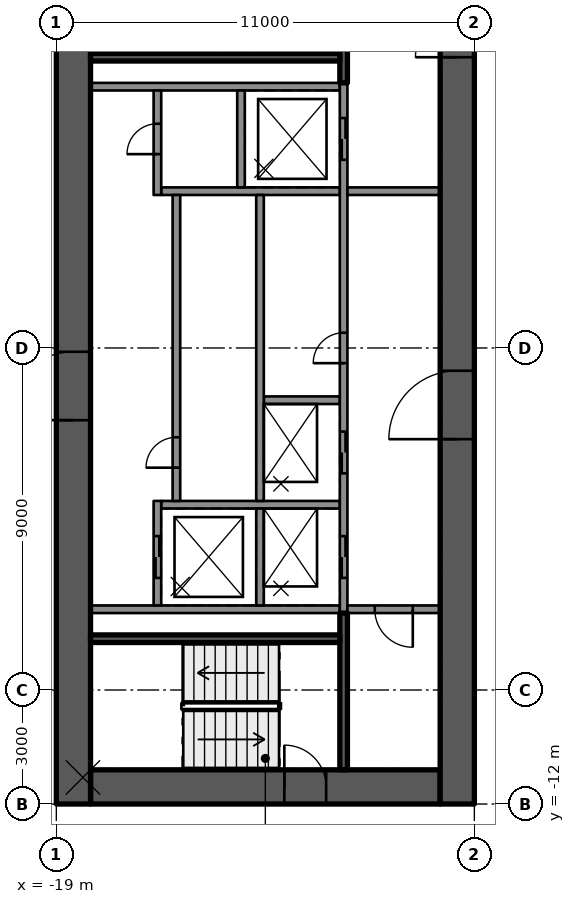
"""IFC4 building model, lengths in metres.
Left out: names, types, materials, properties, quantities, classifications, styles, units other than length and angle.
Written with IfcOpenShell. Run it as: python <this file> out.ifc"""

import sys

from ifc_helpers import new_model, si_unit, direction, frame, frame_2d, origin, place, context, subcontext, project, spatial, rectangle, extrude, element, fill, save


model = new_model("IFC4")
c1 = context("Model", 3, precision=1e-05, world=origin(), true_north=direction((0.0, 1.0)))
c2 = subcontext(c1, "Body", "Model", "MODEL_VIEW")
j1 = project(units=[si_unit("LENGTHUNIT", "METRE"), si_unit("PLANEANGLEUNIT", "RADIAN")], contexts=[c1])
p1 = place(None, origin())
s1 = spatial("IfcSite", under=j1, at=p1, CompositionType="ELEMENT")
p2 = place(p1, origin())
s2 = spatial("IfcBuilding", under=s1, at=p2, CompositionType="ELEMENT")
p3 = place(p2, frame((0.0, 0.0, 217.5)))
s3 = spatial("IfcBuildingStorey", under=s2, at=p3, CompositionType="ELEMENT", Elevation=217.5)
p4 = place(p3, frame((-18.1, -11.55, 0.0), z_axis=(0.0, 0.0, 1.0), x_axis=(1.0, 0.0, 0.0)))
e1 = element("IfcWall", 1, at=p4, inside=s3, PredefinedType="SHEAR", context=c2, shape_type="SweptSolid", body=[
    extrude(rectangle(XDim=9.2, YDim=0.9, at=frame_2d((4.6, 0.0))), origin(), (0.0, 0.0, 1.0), 3.5),
])
p5 = place(p4, frame((5.1, 0.0, 0.0)))
e2 = element("IfcOpeningElement", 2, at=p5, cuts=e1, PredefinedType="OPENING", context=c2, shape_type="SweptSolid", body=[
    extrude(rectangle(XDim=1.1, YDim=2.1, at=frame_2d((0.55, 1.05))), frame((0.0, 0.46, 0.0), z_axis=(0.0, -1.0, 0.0), x_axis=(1.0, 0.0, 0.0)), (0.0, 0.0, 1.0), 0.92),
])
p6 = place(p3, frame((-18.55, -12.0, 0.0), z_axis=(0.0, 0.0, 1.0), x_axis=(0.0, 1.0, 0.0)))
e3 = element("IfcWall", 3, at=p6, inside=s3, PredefinedType="SHEAR", context=c2, shape_type="SweptSolid", body=[
    extrude(rectangle(XDim=24.0, YDim=0.9, at=frame_2d((12.0, 0.0))), origin(), (0.0, 0.0, 1.0), 3.5),
])
p7 = place(p6, frame((10.1, 0.0, 0.0)))
e4 = element("IfcOpeningElement", 4, at=p7, cuts=e3, PredefinedType="OPENING", context=c2, shape_type="SweptSolid", body=[
    extrude(rectangle(XDim=1.8, YDim=2.1, at=frame_2d((0.9, 1.05))), frame((0.0, 0.46, 0.0), z_axis=(0.0, -1.0, 0.0), x_axis=(1.0, 0.0, 0.0)), (0.0, 0.0, 1.0), 0.92),
])
p8 = place(p3, frame((-8.45, -12.0, 0.0), z_axis=(0.0, 0.0, 1.0), x_axis=(0.0, 1.0, 0.0)))
e5 = element("IfcWall", 5, at=p8, inside=s3, PredefinedType="SHEAR", context=c2, shape_type="SweptSolid", body=[
    extrude(rectangle(XDim=24.0, YDim=0.9, at=frame_2d((12.0, 0.0))), origin(), (0.0, 0.0, 1.0), 3.5),
])
p9 = place(p8, frame((9.6, 0.0, 0.0)))
e6 = element("IfcOpeningElement", 6, at=p9, cuts=e5, PredefinedType="OPENING", context=c2, shape_type="SweptSolid", body=[
    extrude(rectangle(XDim=1.8, YDim=2.1, at=frame_2d((0.9, 1.05))), frame((0.0, 0.46, 0.0), z_axis=(0.0, -1.0, 0.0), x_axis=(1.0, 0.0, 0.0)), (0.0, 0.0, 1.0), 0.92),
])
p10 = place(p8, frame((19.65, 0.0, 0.0)))
e7 = element("IfcOpeningElement", 7, at=p10, cuts=e5, PredefinedType="OPENING", context=c2, shape_type="SweptSolid", body=[
    extrude(rectangle(XDim=1.1, YDim=2.1, at=frame_2d((0.55, 1.05))), frame((0.0, 0.46, 0.0), z_axis=(0.0, -1.0, 0.0), x_axis=(1.0, 0.0, 0.0)), (0.0, 0.0, 1.0), 0.92),
])
for number, where, z_axis, x_axis in (
    (8, (-11.54, 6.875, 0.0), (0.0, 0.0, 1.0), (-1.0, 0.0, 0.0)),
    (9, (-11.54, -6.875, 0.0), (0.0, 0.0, 1.0), (-1.0, 0.0, 0.0)),
):
    element("IfcWall", number, at=place(p3, frame(where, z_axis=z_axis, x_axis=x_axis)), inside=s3, PredefinedType="SOLIDWALL", context=c2, shape_type="SweptSolid", body=[
        extrude(rectangle(XDim=6.56, YDim=0.2, at=frame_2d((3.28, 0.0))), origin(), (0.0, 0.0, 1.0), 3.08),
    ])
p11 = place(p3, frame((-11.54, -4.125, 0.0), z_axis=(0.0, 0.0, 1.0), x_axis=(-1.0, 0.0, 0.0)))
e10 = element("IfcWall", 10, at=p11, inside=s3, PredefinedType="SOLIDWALL", context=c2, shape_type="SweptSolid", body=[
    extrude(rectangle(XDim=4.7, YDim=0.2, at=frame_2d((2.35, 0.0))), origin(), (0.0, 0.0, 1.0), 3.08),
])
p12 = place(p3, frame((-11.54, -1.375, 0.0), z_axis=(0.0, 0.0, 1.0), x_axis=(-1.0, 0.0, 0.0)))
e11 = element("IfcWall", 11, at=p12, inside=s3, PredefinedType="SOLIDWALL", context=c2, shape_type="SweptSolid", body=[
    extrude(rectangle(XDim=2.0, YDim=0.2, at=frame_2d((1.0, 0.0))), origin(), (0.0, 0.0, 1.0), 3.08),
])
p13 = place(p3, frame((-11.54, 4.125, 0.0), z_axis=(0.0, 0.0, 1.0), x_axis=(-1.0, 0.0, 0.0)))
e12 = element("IfcWall", 12, at=p13, inside=s3, PredefinedType="SOLIDWALL", context=c2, shape_type="SweptSolid", body=[
    extrude(rectangle(XDim=4.7, YDim=0.2, at=frame_2d((2.35, 0.0))), origin(), (0.0, 0.0, 1.0), 3.08),
])
p14 = place(p3, frame((-11.44, -6.975, 0.0), z_axis=(0.0, 0.0, 1.0), x_axis=(0.0, 1.0, 0.0)))
e13 = element("IfcWall", 13, at=p14, inside=s3, PredefinedType="SOLIDWALL", context=c2, shape_type="SweptSolid", body=[
    extrude(rectangle(XDim=13.95, YDim=0.2, at=frame_2d((6.975, 0.0))), origin(), (0.0, 0.0, 1.0), 3.08),
])
p15 = place(p14, frame((0.925, 0.0, 0.0)))
e14 = element("IfcOpeningElement", 14, at=p15, cuts=e13, PredefinedType="OPENING", context=c2, shape_type="SweptSolid", body=[
    extrude(rectangle(XDim=1.1, YDim=2.1, at=frame_2d((0.55, 1.05))), frame((0.0, 0.11, 0.0), z_axis=(0.0, -1.0, 0.0), x_axis=(1.0, 0.0, 0.0)), (0.0, 0.0, 1.0), 0.22),
])
p16 = place(p14, frame((3.675, 0.0, 0.0)))
e15 = element("IfcOpeningElement", 15, at=p16, cuts=e13, PredefinedType="OPENING", context=c2, shape_type="SweptSolid", body=[
    extrude(rectangle(XDim=1.1, YDim=2.1, at=frame_2d((0.55, 1.05))), frame((0.0, 0.11, 0.0), z_axis=(0.0, -1.0, 0.0), x_axis=(1.0, 0.0, 0.0)), (0.0, 0.0, 1.0), 0.22),
])
p17 = place(p14, frame((11.925, 0.0, 0.0)))
e16 = element("IfcOpeningElement", 16, at=p17, cuts=e13, PredefinedType="OPENING", context=c2, shape_type="SweptSolid", body=[
    extrude(rectangle(XDim=1.1, YDim=2.1, at=frame_2d((0.55, 1.05))), frame((0.0, 0.11, 0.0), z_axis=(0.0, -1.0, 0.0), x_axis=(1.0, 0.0, 0.0)), (0.0, 0.0, 1.0), 0.22),
])
p18 = place(p14, frame((6.575, 0.0, 0.0)))
e17 = element("IfcOpeningElement", 17, at=p18, cuts=e13, PredefinedType="OPENING", context=c2, shape_type="SweptSolid", body=[
    extrude(rectangle(XDim=0.8, YDim=2.1, at=frame_2d((0.4, 1.05))), frame((0.0, 0.11, 0.0), z_axis=(0.0, -1.0, 0.0), x_axis=(1.0, 0.0, 0.0)), (0.0, 0.0, 1.0), 0.22),
])
p19 = place(p3, frame((-13.64, -6.775, 0.0), z_axis=(0.0, 0.0, 1.0), x_axis=(0.0, 1.0, 0.0)))
e18 = element("IfcWall", 18, at=p19, inside=s3, PredefinedType="SOLIDWALL", context=c2, shape_type="SweptSolid", body=[
    extrude(rectangle(XDim=2.55, YDim=0.2, at=frame_2d((1.275, 0.0))), origin(), (0.0, 0.0, 1.0), 3.08),
])
p20 = place(p3, frame((-13.64, -4.025, 0.0), z_axis=(0.0, 0.0, 1.0), x_axis=(0.0, 1.0, 0.0)))
e19 = element("IfcWall", 19, at=p20, inside=s3, PredefinedType="SOLIDWALL", context=c2, shape_type="SweptSolid", body=[
    extrude(rectangle(XDim=8.05, YDim=0.2, at=frame_2d((4.025, 0.0))), origin(), (0.0, 0.0, 1.0), 3.08),
])
p21 = place(p3, frame((-14.14, 4.225, 0.0), z_axis=(0.0, 0.0, 1.0), x_axis=(0.0, 1.0, 0.0)))
e20 = element("IfcWall", 20, at=p21, inside=s3, PredefinedType="SOLIDWALL", context=c2, shape_type="SweptSolid", body=[
    extrude(rectangle(XDim=2.55, YDim=0.2, at=frame_2d((1.275, 0.0))), origin(), (0.0, 0.0, 1.0), 3.08),
])
p22 = place(p3, frame((-16.34, -6.775, 0.0), z_axis=(0.0, 0.0, 1.0), x_axis=(0.0, 1.0, 0.0)))
e21 = element("IfcWall", 21, at=p22, inside=s3, PredefinedType="SOLIDWALL", context=c2, shape_type="SweptSolid", body=[
    extrude(rectangle(XDim=2.75, YDim=0.2, at=frame_2d((1.375, 0.0))), origin(), (0.0, 0.0, 1.0), 3.08),
])
p23 = place(p22, frame((0.725, 0.0, 0.0)))
e22 = element("IfcOpeningElement", 22, at=p23, cuts=e21, PredefinedType="OPENING", context=c2, shape_type="SweptSolid", body=[
    extrude(rectangle(XDim=1.1, YDim=2.1, at=frame_2d((0.55, 1.05))), frame((0.0, 0.11, 0.0), z_axis=(0.0, -1.0, 0.0), x_axis=(1.0, 0.0, 0.0)), (0.0, 0.0, 1.0), 0.22),
])
p24 = place(p3, frame((-15.84, -4.025, 0.0), z_axis=(0.0, 0.0, 1.0), x_axis=(0.0, 1.0, 0.0)))
e23 = element("IfcWall", 23, at=p24, inside=s3, PredefinedType="SOLIDWALL", context=c2, shape_type="SweptSolid", body=[
    extrude(rectangle(XDim=8.05, YDim=0.2, at=frame_2d((4.025, 0.0))), origin(), (0.0, 0.0, 1.0), 3.08),
])
p25 = place(p24, frame((0.875, 0.0, 0.0)))
e24 = element("IfcOpeningElement", 24, at=p25, cuts=e23, PredefinedType="OPENING", context=c2, shape_type="SweptSolid", body=[
    extrude(rectangle(XDim=0.8, YDim=2.1, at=frame_2d((0.4, 1.05))), frame((0.0, 0.11, 0.0), z_axis=(0.0, -1.0, 0.0), x_axis=(1.0, 0.0, 0.0)), (0.0, 0.0, 1.0), 0.22),
])
p26 = place(p3, frame((-16.34, 4.025, 0.0), z_axis=(0.0, 0.0, 1.0), x_axis=(0.0, 1.0, 0.0)))
e25 = element("IfcWall", 25, at=p26, inside=s3, PredefinedType="SOLIDWALL", context=c2, shape_type="SweptSolid", body=[
    extrude(rectangle(XDim=2.75, YDim=0.2, at=frame_2d((1.375, 0.0))), origin(), (0.0, 0.0, 1.0), 3.08),
])
p27 = place(p26, frame((1.075, 0.0, 0.0)))
e26 = element("IfcOpeningElement", 26, at=p27, cuts=e25, PredefinedType="OPENING", context=c2, shape_type="SweptSolid", body=[
    extrude(rectangle(XDim=0.8, YDim=2.1, at=frame_2d((0.4, 1.05))), frame((0.0, 0.11, 0.0), z_axis=(0.0, -1.0, 0.0), x_axis=(1.0, 0.0, 0.0)), (0.0, 0.0, 1.0), 0.22),
])
p28 = place(p3, frame((-11.44, 6.975, 0.0), z_axis=(0.0, 0.0, 1.0), x_axis=(0.0, 1.0, 0.0)))
e27 = element("IfcWall", 27, at=p28, inside=s3, PredefinedType="SOLIDWALL", context=c2, shape_type="SweptSolid", body=[
    extrude(rectangle(XDim=4.125, YDim=0.2, at=frame_2d((2.062, 0.0))), origin(), (0.0, 0.0, 1.0), 3.08),
])
p29 = place(p28, frame((2.1, 0.0, 0.0)))
e28 = element("IfcOpeningElement", 28, at=p29, cuts=e27, PredefinedType="OPENING", context=c2, shape_type="SweptSolid", body=[
    extrude(rectangle(XDim=1.1, YDim=2.1, at=frame_2d((0.55, 1.05))), frame((0.0, 0.11, 0.0), z_axis=(0.0, -1.0, 0.0), x_axis=(1.0, 0.0, 0.0)), (0.0, 0.0, 1.0), 0.22),
])
p30 = place(p3, frame((-11.54, 7.65, 0.0), z_axis=(0.0, 0.0, 1.0), x_axis=(-1.0, 0.0, 0.0)))
e29 = element("IfcWall", 29, at=p30, inside=s3, PredefinedType="SOLIDWALL", context=c2, shape_type="SweptSolid", body=[
    extrude(rectangle(XDim=6.56, YDim=0.2, at=frame_2d((3.28, 0.0))), origin(), (0.0, 0.0, 1.0), 3.08),
])
p31 = place(p3, frame((-11.44, -11.1, 0.0), z_axis=(0.0, 0.0, 1.0), x_axis=(0.0, 1.0, 0.0)))
e30 = element("IfcWall", 30, at=p31, inside=s3, PredefinedType="SOLIDWALL", context=c2, shape_type="SweptSolid", body=[
    extrude(rectangle(XDim=4.125, YDim=0.2, at=frame_2d((2.062, 0.0))), origin(), (0.0, 0.0, 1.0), 3.08),
])
p32 = place(p3, frame((-11.54, -7.65, 0.0), z_axis=(0.0, 0.0, 1.0), x_axis=(-1.0, 0.0, 0.0)))
e31 = element("IfcWall", 31, at=p32, inside=s3, PredefinedType="SOLIDWALL", context=c2, shape_type="SweptSolid", body=[
    extrude(rectangle(XDim=6.56, YDim=0.2, at=frame_2d((3.28, 0.0))), origin(), (0.0, 0.0, 1.0), 3.08),
])
p33 = place(p3, frame((-8.9, 4.125, 0.0), z_axis=(0.0, 0.0, 1.0), x_axis=(-1.0, 0.0, 0.0)))
e32 = element("IfcWall", 32, at=p33, inside=s3, PredefinedType="PARTITIONING", context=c2, shape_type="SweptSolid", body=[
    extrude(rectangle(XDim=2.44, YDim=0.2, at=frame_2d((1.22, 0.0))), origin(), (0.0, 0.0, 1.0), 3.08),
])
p34 = place(p3, frame((-8.9, -6.875, 0.0), z_axis=(0.0, 0.0, 1.0), x_axis=(-1.0, 0.0, 0.0)))
e33 = element("IfcWall", 33, at=p34, inside=s3, PredefinedType="PARTITIONING", context=c2, shape_type="SweptSolid", body=[
    extrude(rectangle(XDim=2.44, YDim=0.2, at=frame_2d((1.22, 0.0))), origin(), (0.0, 0.0, 1.0), 3.08),
])
p35 = place(p34, frame((0.72, 0.0, 0.0)))
e34 = element("IfcOpeningElement", 34, at=p35, cuts=e33, PredefinedType="OPENING", context=c2, shape_type="SweptSolid", body=[
    extrude(rectangle(XDim=1.0, YDim=2.1, at=frame_2d((0.5, 1.05))), frame((0.0, 0.11, 0.0), z_axis=(0.0, -1.0, 0.0), x_axis=(1.0, 0.0, 0.0)), (0.0, 0.0, 1.0), 0.22),
])
p36 = place(p15, origin())
e35 = element("IfcDoor", 35, at=p36, inside=s3, OperationType="DOUBLE_DOOR_SLIDING", PredefinedType="DOOR", context=c2, shape_type="SweptSolid", body=[
    extrude(rectangle(XDim=1.1, YDim=2.1, at=frame_2d((0.55, 1.05))), frame((0.0, 0.025, 0.0), z_axis=(0.0, -1.0, 0.0), x_axis=(1.0, 0.0, 0.0)), (0.0, 0.0, 1.0), 0.05),
])
fill(e14, e35)
p37 = place(p23, origin())
e36 = element("IfcDoor", 36, at=p37, inside=s3, OperationType="DOUBLE_DOOR_SLIDING", PredefinedType="DOOR", context=c2, shape_type="SweptSolid", body=[
    extrude(rectangle(XDim=1.1, YDim=2.1, at=frame_2d((0.55, 1.05))), frame((0.0, 0.025, 0.0), z_axis=(0.0, -1.0, 0.0), x_axis=(1.0, 0.0, 0.0)), (0.0, 0.0, 1.0), 0.05),
])
fill(e22, e36)
p38 = place(p16, origin())
e37 = element("IfcDoor", 37, at=p38, inside=s3, OperationType="DOUBLE_DOOR_SLIDING", PredefinedType="DOOR", context=c2, shape_type="SweptSolid", body=[
    extrude(rectangle(XDim=1.1, YDim=2.1, at=frame_2d((0.55, 1.05))), frame((0.0, 0.025, 0.0), z_axis=(0.0, -1.0, 0.0), x_axis=(1.0, 0.0, 0.0)), (0.0, 0.0, 1.0), 0.05),
])
fill(e15, e37)
p39 = place(p17, origin())
e38 = element("IfcDoor", 38, at=p39, inside=s3, OperationType="DOUBLE_DOOR_SLIDING", PredefinedType="DOOR", context=c2, shape_type="SweptSolid", body=[
    extrude(rectangle(XDim=1.1, YDim=2.1, at=frame_2d((0.55, 1.05))), frame((0.0, 0.025, 0.0), z_axis=(0.0, -1.0, 0.0), x_axis=(1.0, 0.0, 0.0)), (0.0, 0.0, 1.0), 0.05),
])
fill(e16, e38)
p40 = place(p25, origin())
e39 = element("IfcDoor", 39, at=p40, inside=s3, OperationType="SINGLE_SWING_LEFT", PredefinedType="DOOR", context=c2, shape_type="SweptSolid", body=[
    extrude(rectangle(XDim=0.8, YDim=2.1, at=frame_2d((0.4, 1.05))), frame((0.0, 0.025, 0.0), z_axis=(0.0, -1.0, 0.0), x_axis=(1.0, 0.0, 0.0)), (0.0, 0.0, 1.0), 0.05),
])
fill(e24, e39)
p41 = place(p18, origin())
e40 = element("IfcDoor", 40, at=p41, inside=s3, OperationType="SINGLE_SWING_LEFT", PredefinedType="DOOR", context=c2, shape_type="SweptSolid", body=[
    extrude(rectangle(XDim=0.8, YDim=2.1, at=frame_2d((0.4, 1.05))), frame((0.0, 0.025, 0.0), z_axis=(0.0, -1.0, 0.0), x_axis=(1.0, 0.0, 0.0)), (0.0, 0.0, 1.0), 0.05),
])
fill(e17, e40)
p42 = place(p27, origin())
e41 = element("IfcDoor", 41, at=p42, inside=s3, OperationType="SINGLE_SWING_LEFT", PredefinedType="DOOR", context=c2, shape_type="SweptSolid", body=[
    extrude(rectangle(XDim=0.8, YDim=2.1, at=frame_2d((0.4, 1.05))), frame((0.0, 0.025, 0.0), z_axis=(0.0, -1.0, 0.0), x_axis=(1.0, 0.0, 0.0)), (0.0, 0.0, 1.0), 0.05),
])
fill(e26, e41)
p43 = place(p9, origin())
e42 = element("IfcDoor", 42, at=p43, inside=s3, OperationType="SINGLE_SWING_LEFT", PredefinedType="DOOR", context=c2, shape_type="SweptSolid", body=[
    extrude(rectangle(XDim=1.8, YDim=2.1, at=frame_2d((0.9, 1.05))), frame((0.0, 0.025, 0.0), z_axis=(0.0, -1.0, 0.0), x_axis=(1.0, 0.0, 0.0)), (0.0, 0.0, 1.0), 0.05),
])
fill(e6, e42)
p44 = place(p7, origin())
e43 = element("IfcDoor", 43, at=p44, inside=s3, OperationType="SINGLE_SWING_LEFT", PredefinedType="DOOR", context=c2, shape_type="SweptSolid", body=[
    extrude(rectangle(XDim=1.8, YDim=2.1, at=frame_2d((0.9, 1.05))), frame((0.0, 0.025, 0.0), z_axis=(0.0, -1.0, 0.0), x_axis=(1.0, 0.0, 0.0)), (0.0, 0.0, 1.0), 0.05),
])
fill(e4, e43)
p45 = place(p10, origin())
e44 = element("IfcDoor", 44, at=p45, inside=s3, OperationType="SINGLE_SWING_RIGHT", PredefinedType="DOOR", context=c2, shape_type="SweptSolid", body=[
    extrude(rectangle(XDim=1.1, YDim=2.1, at=frame_2d((0.55, 1.05))), frame((0.0, 0.025, 0.0), z_axis=(0.0, -1.0, 0.0), x_axis=(1.0, 0.0, 0.0)), (0.0, 0.0, 1.0), 0.05),
])
fill(e7, e44)
p46 = place(p5, origin())
e45 = element("IfcDoor", 45, at=p46, inside=s3, OperationType="SINGLE_SWING_RIGHT", PredefinedType="DOOR", context=c2, shape_type="SweptSolid", body=[
    extrude(rectangle(XDim=1.1, YDim=2.1, at=frame_2d((0.55, 1.05))), frame((0.0, 0.025, 0.0), z_axis=(0.0, -1.0, 0.0), x_axis=(1.0, 0.0, 0.0)), (0.0, 0.0, 1.0), 0.05),
])
fill(e2, e45)
p47 = place(p35, origin())
e46 = element("IfcDoor", 46, at=p47, inside=s3, OperationType="SINGLE_SWING_RIGHT", PredefinedType="DOOR", context=c2, shape_type="SweptSolid", body=[
    extrude(rectangle(XDim=1.0, YDim=2.1, at=frame_2d((0.5, 1.05))), frame((0.0, 0.025, 0.0), z_axis=(0.0, -1.0, 0.0), x_axis=(1.0, 0.0, 0.0)), (0.0, 0.0, 1.0), 0.05),
])
fill(e34, e46)
save(model, sys.argv[1])
